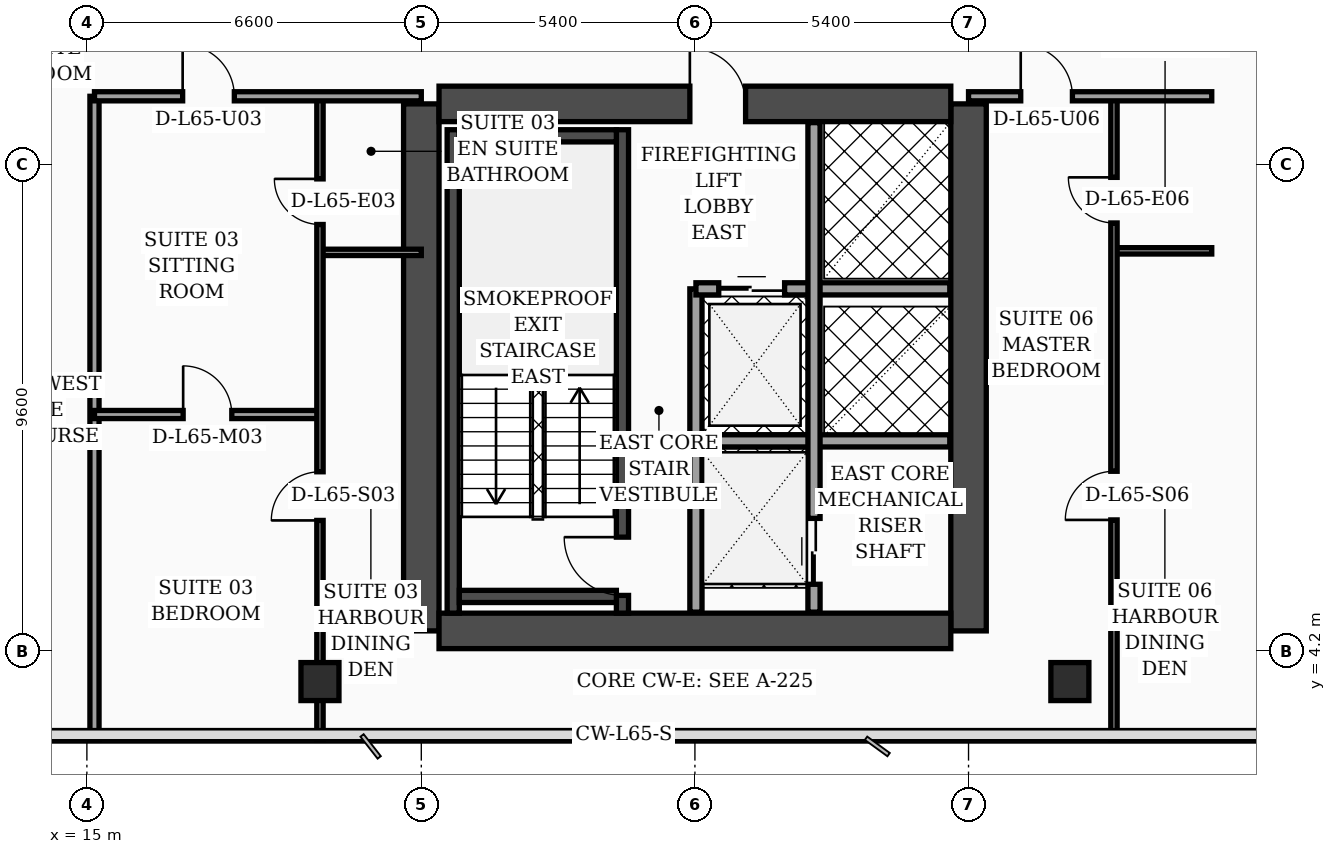
"""IFC4 building model, lengths in metres.
Left out: names, types, materials, properties, quantities, classifications, styles, units other than length and angle.
Written with IfcOpenShell. Run it as: python <this file> out.ifc"""

import sys

from ifc_helpers import new_model, si_unit, direction, frame, frame_2d, origin, origin_2d, place, context, subcontext, project, spatial, rectangle, hollow_rectangle, extrude, element, fill, save


model = new_model("IFC4")
c1 = context("Model", 3, precision=1e-05, world=origin(), true_north=direction((0.0, 1.0)))
c2 = subcontext(c1, "Body", "Model", "MODEL_VIEW")
j1 = project(units=[si_unit("LENGTHUNIT", "METRE"), si_unit("PLANEANGLEUNIT", "RADIAN")], contexts=[c1])
p1 = place(None, origin())
s1 = spatial("IfcSite", under=j1, at=p1, CompositionType="ELEMENT")
p2 = place(p1, origin())
s2 = spatial("IfcBuilding", under=s1, at=p2, CompositionType="ELEMENT")
p3 = place(p2, frame((0.0, 0.0, 263.5)))
s3 = spatial("IfcBuildingStorey", under=s2, at=p3, CompositionType="ELEMENT", Elevation=263.5)
for number, where, z_axis, x_axis in (
    (1, (21.6, 4.6, 0.0), (0.0, 0.0, 1.0), (0.0, 1.0, 0.0)),
    (2, (32.4, 4.6, 0.0), (0.0, 0.0, 1.0), (0.0, 1.0, 0.0)),
):
    element("IfcWall", number, at=place(p3, frame(where, z_axis=z_axis, x_axis=x_axis)), inside=s3, PredefinedType="SHEAR", context=c2, shape_type="SweptSolid", body=[
        extrude(rectangle(XDim=10.4, YDim=0.7, at=frame_2d((5.2, 0.0))), origin(), (0.0, 0.0, 1.0), 3.56),
    ])
p4 = place(p3, frame((21.95, 15.0, 0.0), z_axis=(0.0, 0.0, 1.0), x_axis=(1.0, 0.0, 0.0)))
e3 = element("IfcWall", 3, at=p4, inside=s3, PredefinedType="SHEAR", context=c2, shape_type="SweptSolid", body=[
    extrude(rectangle(XDim=10.1, YDim=0.7, at=frame_2d((5.05, 0.0))), origin(), (0.0, 0.0, 1.0), 3.56),
])
p5 = place(p4, frame((4.95, 0.0, 0.0)))
e4 = element("IfcOpeningElement", 4, at=p5, cuts=e3, PredefinedType="OPENING", context=c2, shape_type="SweptSolid", body=[
    extrude(rectangle(XDim=1.1, YDim=2.2, at=frame_2d((0.55, 1.1))), frame((0.0, 0.36, 0.0), z_axis=(0.0, -1.0, 0.0), x_axis=(1.0, 0.0, 0.0)), (0.0, 0.0, 1.0), 0.72),
])
p6 = place(p3, frame((21.95, 4.6, 0.0), z_axis=(0.0, 0.0, 1.0), x_axis=(1.0, 0.0, 0.0)))
e5 = element("IfcWall", 5, at=p6, inside=s3, PredefinedType="SHEAR", context=c2, shape_type="SweptSolid", body=[
    extrude(rectangle(XDim=10.1, YDim=0.7, at=frame_2d((5.05, 0.0))), origin(), (0.0, 0.0, 1.0), 3.56),
])
p7 = place(p3, frame((22.23, 4.95, 0.0), z_axis=(0.0, 0.0, 1.0), x_axis=(0.0, 1.0, 0.0)))
e6 = element("IfcWall", 6, at=p7, inside=s3, PredefinedType="SOLIDWALL", context=c2, shape_type="SweptSolid", body=[
    extrude(rectangle(XDim=9.54, YDim=0.24, at=frame_2d((4.77, 0.0))), origin(), (0.0, 0.0, 1.0), 3.56),
])
p8 = place(p3, frame((25.57, 4.95, 0.0), z_axis=(0.0, 0.0, 1.0), x_axis=(0.0, 1.0, 0.0)))
e7 = element("IfcWall", 7, at=p8, inside=s3, PredefinedType="SOLIDWALL", context=c2, shape_type="SweptSolid", body=[
    extrude(rectangle(XDim=9.54, YDim=0.24, at=frame_2d((4.77, 0.0))), origin(), (0.0, 0.0, 1.0), 3.56),
])
p9 = place(p8, frame((0.35, 0.0, 0.0)))
e8 = element("IfcOpeningElement", 8, at=p9, cuts=e7, PredefinedType="OPENING", context=c2, shape_type="SweptSolid", body=[
    extrude(rectangle(XDim=1.15, YDim=2.2, at=frame_2d((0.575, 1.1))), frame((0.0, 0.13, 0.0), z_axis=(0.0, -1.0, 0.0), x_axis=(1.0, 0.0, 0.0)), (0.0, 0.0, 1.0), 0.26),
])
for number, where, z_axis, x_axis in (
    (9, (22.35, 5.28, 0.0), (0.0, 0.0, 1.0), (1.0, 0.0, 0.0)),
    (10, (22.35, 14.37, 0.0), (0.0, 0.0, 1.0), (1.0, 0.0, 0.0)),
):
    element("IfcWall", number, at=place(p3, frame(where, z_axis=z_axis, x_axis=x_axis)), inside=s3, PredefinedType="SOLIDWALL", context=c2, shape_type="SweptSolid", body=[
        extrude(rectangle(XDim=3.1, YDim=0.24, at=frame_2d((1.55, 0.0))), origin(), (0.0, 0.0, 1.0), 3.56),
    ])
for number, where, z_axis, x_axis in (
    (11, (19.6, 3.6, 0.0), (0.0, 0.0, 1.0), (1.0, 0.0, 0.0)),
    (12, (34.4, 3.6, 0.0), (0.0, 0.0, 1.0), (1.0, 0.0, 0.0)),
):
    element("IfcColumn", number, at=place(p3, frame(where, z_axis=z_axis, x_axis=x_axis)), inside=s3, PredefinedType="COLUMN", context=c2, shape_type="SweptSolid", body=[
        extrude(hollow_rectangle(XDim=0.75, YDim=0.75, WallThickness=0.032, at=origin_2d()), origin(), (0.0, 0.0, 1.0), 3.56),
    ])
p10 = place(p3, frame((43.83, 5.505, 0.0), z_axis=(0.0, 0.0, 1.0), x_axis=(-0.300509063924, 0.953778958931, 0.0)))
e13 = element("IfcWall", 13, at=p10, inside=s3, PredefinedType="SOLIDWALL", context=c2, shape_type="SweptSolid", body=[
    extrude(rectangle(XDim=30.814, YDim=0.32, at=frame_2d((15.407, 0.0))), origin(), (0.0, 0.0, 1.0), 3.56),
])
p11 = place(p10, frame((8.9, 0.0, 0.0)))
e14 = element("IfcOpeningElement", 14, at=p11, cuts=e13, PredefinedType="OPENING", context=c2, shape_type="SweptSolid", body=[
    extrude(rectangle(XDim=1.4, YDim=2.25, at=frame_2d((0.7, 1.125))), frame((0.0, 0.17, 0.0), z_axis=(0.0, -1.0, 0.0), x_axis=(1.0, 0.0, 0.0)), (0.0, 0.0, 1.0), 0.34),
])
p12 = place(p10, frame((4.437, 0.0, 0.7)))
e15 = element("IfcOpeningElement", 15, at=p12, cuts=e13, PredefinedType="OPENING", context=c2, shape_type="SweptSolid", body=[
    extrude(rectangle(XDim=1.6, YDim=1.65, at=frame_2d((0.8, 0.825))), frame((0.0, 0.17, 0.0), z_axis=(0.0, -1.0, 0.0), x_axis=(1.0, 0.0, 0.0)), (0.0, 0.0, 1.0), 0.34),
])
p13 = place(p10, frame((18.696, 0.0, 0.7)))
e16 = element("IfcOpeningElement", 16, at=p13, cuts=e13, PredefinedType="OPENING", context=c2, shape_type="SweptSolid", body=[
    extrude(rectangle(XDim=1.6, YDim=1.65, at=frame_2d((0.8, 0.825))), frame((0.0, 0.17, 0.0), z_axis=(0.0, -1.0, 0.0), x_axis=(1.0, 0.0, 0.0)), (0.0, 0.0, 1.0), 0.34),
])
p14 = place(p10, frame((1.6, 0.0, 0.75)))
e17 = element("IfcOpeningElement", 17, at=p14, cuts=e13, PredefinedType="OPENING", context=c2, shape_type="SweptSolid", body=[
    extrude(rectangle(XDim=1.5, YDim=1.6, at=frame_2d((0.75, 0.8))), frame((0.0, 0.17, 0.0), z_axis=(0.0, -1.0, 0.0), x_axis=(1.0, 0.0, 0.0)), (0.0, 0.0, 1.0), 0.34),
])
p15 = place(p10, frame((6.75, 0.0, 0.75)))
e18 = element("IfcOpeningElement", 18, at=p15, cuts=e13, PredefinedType="OPENING", context=c2, shape_type="SweptSolid", body=[
    extrude(rectangle(XDim=1.5, YDim=1.6, at=frame_2d((0.75, 0.8))), frame((0.0, 0.17, 0.0), z_axis=(0.0, -1.0, 0.0), x_axis=(1.0, 0.0, 0.0)), (0.0, 0.0, 1.0), 0.34),
])
p16 = place(p10, frame((10.9, 0.0, 0.75)))
e19 = element("IfcOpeningElement", 19, at=p16, cuts=e13, PredefinedType="OPENING", context=c2, shape_type="SweptSolid", body=[
    extrude(rectangle(XDim=1.5, YDim=1.6, at=frame_2d((0.75, 0.8))), frame((0.0, 0.17, 0.0), z_axis=(0.0, -1.0, 0.0), x_axis=(1.0, 0.0, 0.0)), (0.0, 0.0, 1.0), 0.34),
])
p17 = place(p10, frame((14.0, 0.0, 0.75)))
e20 = element("IfcOpeningElement", 20, at=p17, cuts=e13, PredefinedType="OPENING", context=c2, shape_type="SweptSolid", body=[
    extrude(rectangle(XDim=1.5, YDim=1.6, at=frame_2d((0.75, 0.8))), frame((0.0, 0.17, 0.0), z_axis=(0.0, -1.0, 0.0), x_axis=(1.0, 0.0, 0.0)), (0.0, 0.0, 1.0), 0.34),
])
p18 = place(p10, frame((16.55, 0.0, 0.75)))
e21 = element("IfcOpeningElement", 21, at=p18, cuts=e13, PredefinedType="OPENING", context=c2, shape_type="SweptSolid", body=[
    extrude(rectangle(XDim=1.5, YDim=1.6, at=frame_2d((0.75, 0.8))), frame((0.0, 0.17, 0.0), z_axis=(0.0, -1.0, 0.0), x_axis=(1.0, 0.0, 0.0)), (0.0, 0.0, 1.0), 0.34),
])
p19 = place(p10, frame((20.75, 0.0, 0.75)))
e22 = element("IfcOpeningElement", 22, at=p19, cuts=e13, PredefinedType="OPENING", context=c2, shape_type="SweptSolid", body=[
    extrude(rectangle(XDim=1.5, YDim=1.6, at=frame_2d((0.75, 0.8))), frame((0.0, 0.17, 0.0), z_axis=(0.0, -1.0, 0.0), x_axis=(1.0, 0.0, 0.0)), (0.0, 0.0, 1.0), 0.34),
])
p20 = place(p10, frame((23.3, 0.0, 0.75)))
e23 = element("IfcOpeningElement", 23, at=p20, cuts=e13, PredefinedType="OPENING", context=c2, shape_type="SweptSolid", body=[
    extrude(rectangle(XDim=1.5, YDim=1.6, at=frame_2d((0.75, 0.8))), frame((0.0, 0.17, 0.0), z_axis=(0.0, -1.0, 0.0), x_axis=(1.0, 0.0, 0.0)), (0.0, 0.0, 1.0), 0.34),
])
p21 = place(p10, frame((26.4, 0.0, 0.75)))
e24 = element("IfcOpeningElement", 24, at=p21, cuts=e13, PredefinedType="OPENING", context=c2, shape_type="SweptSolid", body=[
    extrude(rectangle(XDim=1.5, YDim=1.6, at=frame_2d((0.75, 0.8))), frame((0.0, 0.17, 0.0), z_axis=(0.0, -1.0, 0.0), x_axis=(1.0, 0.0, 0.0)), (0.0, 0.0, 1.0), 0.34),
])
p22 = place(p3, frame((27.02, 4.97, 0.0), z_axis=(0.0, 0.0, 1.0), x_axis=(0.0, 1.0, 0.0)))
e25 = element("IfcWall", 25, at=p22, inside=s3, PredefinedType="SOLIDWALL", context=c2, shape_type="SweptSolid", body=[
    extrude(rectangle(XDim=6.38, YDim=0.24, at=frame_2d((3.19, 0.0))), origin(), (0.0, 0.0, 1.0), 3.56),
])
p23 = place(p3, frame((27.02, 11.35, 0.0), z_axis=(0.0, 0.0, 1.0), x_axis=(1.0, 0.0, 0.0)))
e26 = element("IfcWall", 26, at=p23, inside=s3, PredefinedType="SOLIDWALL", context=c2, shape_type="SweptSolid", body=[
    extrude(rectangle(XDim=5.01, YDim=0.24, at=frame_2d((2.505, 0.0))), origin(), (0.0, 0.0, 1.0), 3.56),
])
p24 = place(p23, frame((0.45, 0.0, 0.0)))
e27 = element("IfcOpeningElement", 27, at=p24, cuts=e26, PredefinedType="OPENING", context=c2, shape_type="SweptSolid", body=[
    extrude(rectangle(XDim=1.3, YDim=2.35, at=frame_2d((0.65, 1.175))), frame((0.0, 0.13, 0.0), z_axis=(0.0, -1.0, 0.0), x_axis=(1.0, 0.0, 0.0)), (0.0, 0.0, 1.0), 0.26),
])
p25 = place(p3, frame((27.02, 8.35, 0.0), z_axis=(0.0, 0.0, 1.0), x_axis=(1.0, 0.0, 0.0)))
e28 = element("IfcWall", 28, at=p25, inside=s3, PredefinedType="SOLIDWALL", context=c2, shape_type="SweptSolid", body=[
    extrude(rectangle(XDim=5.01, YDim=0.24, at=frame_2d((2.505, 0.0))), origin(), (0.0, 0.0, 1.0), 3.09),
])
p26 = place(p3, frame((29.35, 4.97, 0.0), z_axis=(0.0, 0.0, 1.0), x_axis=(0.0, 1.0, 0.0)))
e29 = element("IfcWall", 29, at=p26, inside=s3, PredefinedType="SOLIDWALL", context=c2, shape_type="SweptSolid", body=[
    extrude(rectangle(XDim=9.66, YDim=0.24, at=frame_2d((4.83, 0.0))), origin(), (0.0, 0.0, 1.0), 3.56),
])
p27 = place(p26, frame((0.55, 0.0, 0.0)))
e30 = element("IfcOpeningElement", 30, at=p27, cuts=e29, PredefinedType="OPENING", context=c2, shape_type="SweptSolid", body=[
    extrude(rectangle(XDim=1.3, YDim=2.35, at=frame_2d((0.65, 1.175))), frame((0.0, 0.13, 0.0), z_axis=(0.0, -1.0, 0.0), x_axis=(1.0, 0.0, 0.0)), (0.0, 0.0, 1.0), 0.26),
])
p28 = place(p3, frame((15.15, 2.44, 0.0), z_axis=(0.0, 0.0, 1.0), x_axis=(0.0, 1.0, 0.0)))
e31 = element("IfcWall", 31, at=p28, inside=s3, PredefinedType="PARTITIONING", context=c2, shape_type="SweptSolid", body=[
    extrude(rectangle(XDim=12.71, YDim=0.18, at=frame_2d((6.355, 0.0))), origin(), (0.0, 0.0, 1.0), 3.09),
])
p29 = place(p3, frame((19.6, 12.07, 0.0), z_axis=(0.0, 0.0, 1.0), x_axis=(1.0, 0.0, 0.0)))
e32 = element("IfcWall", 32, at=p29, inside=s3, PredefinedType="PARTITIONING", context=c2, shape_type="SweptSolid", body=[
    extrude(rectangle(XDim=2.0, YDim=0.125, at=frame_2d((1.0, 0.0))), origin(), (0.0, 0.0, 1.0), 3.56),
])
p30 = place(p3, frame((15.15, 8.87, 0.0), z_axis=(0.0, 0.0, 1.0), x_axis=(1.0, 0.0, 0.0)))
e33 = element("IfcWall", 33, at=p30, inside=s3, PredefinedType="PARTITIONING", context=c2, shape_type="SweptSolid", body=[
    extrude(rectangle(XDim=4.45, YDim=0.16, at=frame_2d((2.225, 0.0))), origin(), (0.0, 0.0, 1.0), 3.56),
])
p31 = place(p30, frame((1.75, 0.0, 0.0)))
e34 = element("IfcOpeningElement", 34, at=p31, cuts=e33, PredefinedType="OPENING", context=c2, shape_type="SweptSolid", body=[
    extrude(rectangle(XDim=0.96, YDim=2.2, at=frame_2d((0.48, 1.1))), frame((0.0, 0.09, 0.0), z_axis=(0.0, -1.0, 0.0), x_axis=(1.0, 0.0, 0.0)), (0.0, 0.0, 1.0), 0.18),
])
p32 = place(p3, frame((19.6, 2.44, 0.0), z_axis=(0.0, 0.0, 1.0), x_axis=(0.0, 1.0, 0.0)))
e35 = element("IfcWall", 35, at=p32, inside=s3, PredefinedType="PARTITIONING", context=c2, shape_type="SweptSolid", body=[
    extrude(rectangle(XDim=12.71, YDim=0.125, at=frame_2d((6.355, 0.0))), origin(), (0.0, 0.0, 1.0), 2.59),
])
p33 = place(p32, frame((4.34, 0.0, 0.0)))
e36 = element("IfcOpeningElement", 36, at=p33, cuts=e35, PredefinedType="OPENING", context=c2, shape_type="SweptSolid", body=[
    extrude(rectangle(XDim=0.96, YDim=2.2, at=frame_2d((0.48, 1.1))), frame((0.0, 0.073, 0.0), z_axis=(0.0, -1.0, 0.0), x_axis=(1.0, 0.0, 0.0)), (0.0, 0.0, 1.0), 0.145),
])
p34 = place(p32, frame((10.18, 0.0, 0.0)))
e37 = element("IfcOpeningElement", 37, at=p34, cuts=e35, PredefinedType="OPENING", context=c2, shape_type="SweptSolid", body=[
    extrude(rectangle(XDim=0.9, YDim=2.15, at=frame_2d((0.45, 1.075))), frame((0.0, 0.073, 0.0), z_axis=(0.0, -1.0, 0.0), x_axis=(1.0, 0.0, 0.0)), (0.0, 0.0, 1.0), 0.145),
])
p35 = place(p3, frame((15.15, 15.15, 0.0), z_axis=(0.0, 0.0, 1.0), x_axis=(1.0, 0.0, 0.0)))
e38 = element("IfcWall", 38, at=p35, inside=s3, PredefinedType="PARTITIONING", context=c2, shape_type="SweptSolid", body=[
    extrude(rectangle(XDim=6.45, YDim=0.18, at=frame_2d((3.225, 0.0))), origin(), (0.0, 0.0, 1.0), 2.59),
])
p36 = place(p35, frame((1.74, 0.0, 0.0)))
e39 = element("IfcOpeningElement", 39, at=p36, cuts=e38, PredefinedType="OPENING", context=c2, shape_type="SweptSolid", body=[
    extrude(rectangle(XDim=1.02, YDim=2.2, at=frame_2d((0.51, 1.1))), frame((0.0, 0.1, 0.0), z_axis=(0.0, -1.0, 0.0), x_axis=(1.0, 0.0, 0.0)), (0.0, 0.0, 1.0), 0.2),
])
p37 = place(p3, frame((35.27, 12.1, 0.0), z_axis=(0.0, 0.0, 1.0), x_axis=(1.0, 0.0, 0.0)))
e40 = element("IfcWall", 40, at=p37, inside=s3, PredefinedType="PARTITIONING", context=c2, shape_type="SweptSolid", body=[
    extrude(rectangle(XDim=1.93, YDim=0.125, at=frame_2d((0.965, 0.0))), origin(), (0.0, 0.0, 1.0), 3.56),
])
p38 = place(p3, frame((35.27, 2.44, 0.0), z_axis=(0.0, 0.0, 1.0), x_axis=(0.0, 1.0, 0.0)))
e41 = element("IfcWall", 41, at=p38, inside=s3, PredefinedType="PARTITIONING", context=c2, shape_type="SweptSolid", body=[
    extrude(rectangle(XDim=12.71, YDim=0.125, at=frame_2d((6.355, 0.0))), origin(), (0.0, 0.0, 1.0), 2.99),
])
p39 = place(p38, frame((4.35, 0.0, 0.0)))
e42 = element("IfcOpeningElement", 42, at=p39, cuts=e41, PredefinedType="OPENING", context=c2, shape_type="SweptSolid", body=[
    extrude(rectangle(XDim=0.96, YDim=2.2, at=frame_2d((0.48, 1.1))), frame((0.0, 0.073, 0.0), z_axis=(0.0, -1.0, 0.0), x_axis=(1.0, 0.0, 0.0)), (0.0, 0.0, 1.0), 0.145),
])
p40 = place(p38, frame((10.21, 0.0, 0.0)))
e43 = element("IfcOpeningElement", 43, at=p40, cuts=e41, PredefinedType="OPENING", context=c2, shape_type="SweptSolid", body=[
    extrude(rectangle(XDim=0.9, YDim=2.15, at=frame_2d((0.45, 1.075))), frame((0.0, 0.073, 0.0), z_axis=(0.0, -1.0, 0.0), x_axis=(1.0, 0.0, 0.0)), (0.0, 0.0, 1.0), 0.145),
])
p41 = place(p3, frame((32.4, 15.15, 0.0), z_axis=(0.0, 0.0, 1.0), x_axis=(1.0, 0.0, 0.0)))
e44 = element("IfcWall", 44, at=p41, inside=s3, PredefinedType="PARTITIONING", context=c2, shape_type="SweptSolid", body=[
    extrude(rectangle(XDim=4.8, YDim=0.18, at=frame_2d((2.4, 0.0))), origin(), (0.0, 0.0, 1.0), 2.99),
])
p42 = place(p41, frame((1.03, 0.0, 0.0)))
e45 = element("IfcOpeningElement", 45, at=p42, cuts=e44, PredefinedType="OPENING", context=c2, shape_type="SweptSolid", body=[
    extrude(rectangle(XDim=1.02, YDim=2.2, at=frame_2d((0.51, 1.1))), frame((0.0, 0.1, 0.0), z_axis=(0.0, -1.0, 0.0), x_axis=(1.0, 0.0, 0.0)), (0.0, 0.0, 1.0), 0.2),
])
p43 = place(p24, origin())
e46 = element("IfcDoor", 46, at=p43, inside=s3, OperationType="DOUBLE_DOOR_SLIDING", PredefinedType="DOOR", context=c2, shape_type="SweptSolid", body=[
    extrude(rectangle(XDim=1.3, YDim=2.35, at=frame_2d((0.65, 1.175))), frame((0.0, 0.025, 0.0), z_axis=(0.0, -1.0, 0.0), x_axis=(1.0, 0.0, 0.0)), (0.0, 0.0, 1.0), 0.05),
])
fill(e27, e46)
p44 = place(p27, origin())
e47 = element("IfcDoor", 47, at=p44, inside=s3, OperationType="DOUBLE_DOOR_SLIDING", PredefinedType="DOOR", context=c2, shape_type="SweptSolid", body=[
    extrude(rectangle(XDim=1.3, YDim=2.35, at=frame_2d((0.65, 1.175))), frame((0.0, 0.025, 0.0), z_axis=(0.0, -1.0, 0.0), x_axis=(1.0, 0.0, 0.0)), (0.0, 0.0, 1.0), 0.05),
])
fill(e30, e47)
p45 = place(p31, origin())
e48 = element("IfcDoor", 48, at=p45, inside=s3, OperationType="SINGLE_SWING_LEFT", PredefinedType="DOOR", context=c2, shape_type="SweptSolid", body=[
    extrude(rectangle(XDim=0.96, YDim=2.2, at=frame_2d((0.48, 1.1))), frame((0.0, 0.025, 0.0), z_axis=(0.0, -1.0, 0.0), x_axis=(1.0, 0.0, 0.0)), (0.0, 0.0, 1.0), 0.05),
])
fill(e34, e48)
p46 = place(p33, origin())
e49 = element("IfcDoor", 49, at=p46, inside=s3, OperationType="SINGLE_SWING_LEFT", PredefinedType="DOOR", context=c2, shape_type="SweptSolid", body=[
    extrude(rectangle(XDim=0.96, YDim=2.2, at=frame_2d((0.48, 1.1))), frame((0.0, 0.025, 0.0), z_axis=(0.0, -1.0, 0.0), x_axis=(1.0, 0.0, 0.0)), (0.0, 0.0, 1.0), 0.05),
])
fill(e36, e49)
p47 = place(p34, origin())
e50 = element("IfcDoor", 50, at=p47, inside=s3, OperationType="SINGLE_SWING_RIGHT", PredefinedType="DOOR", context=c2, shape_type="SweptSolid", body=[
    extrude(rectangle(XDim=0.9, YDim=2.15, at=frame_2d((0.45, 1.075))), frame((0.0, 0.025, 0.0), z_axis=(0.0, -1.0, 0.0), x_axis=(1.0, 0.0, 0.0)), (0.0, 0.0, 1.0), 0.05),
])
fill(e37, e50)
p48 = place(p36, origin())
e51 = element("IfcDoor", 51, at=p48, inside=s3, OperationType="SINGLE_SWING_LEFT", PredefinedType="DOOR", context=c2, shape_type="SweptSolid", body=[
    extrude(rectangle(XDim=1.02, YDim=2.2, at=frame_2d((0.51, 1.1))), frame((0.0, 0.025, 0.0), z_axis=(0.0, -1.0, 0.0), x_axis=(1.0, 0.0, 0.0)), (0.0, 0.0, 1.0), 0.05),
])
fill(e39, e51)
p49 = place(p39, origin())
e52 = element("IfcDoor", 52, at=p49, inside=s3, OperationType="SINGLE_SWING_LEFT", PredefinedType="DOOR", context=c2, shape_type="SweptSolid", body=[
    extrude(rectangle(XDim=0.96, YDim=2.2, at=frame_2d((0.48, 1.1))), frame((0.0, 0.025, 0.0), z_axis=(0.0, -1.0, 0.0), x_axis=(1.0, 0.0, 0.0)), (0.0, 0.0, 1.0), 0.05),
])
fill(e42, e52)
p50 = place(p40, origin())
e53 = element("IfcDoor", 53, at=p50, inside=s3, OperationType="SINGLE_SWING_RIGHT", PredefinedType="DOOR", context=c2, shape_type="SweptSolid", body=[
    extrude(rectangle(XDim=0.9, YDim=2.15, at=frame_2d((0.45, 1.075))), frame((0.0, 0.025, 0.0), z_axis=(0.0, -1.0, 0.0), x_axis=(1.0, 0.0, 0.0)), (0.0, 0.0, 1.0), 0.05),
])
fill(e43, e53)
p51 = place(p42, origin())
e54 = element("IfcDoor", 54, at=p51, inside=s3, OperationType="SINGLE_SWING_LEFT", PredefinedType="DOOR", context=c2, shape_type="SweptSolid", body=[
    extrude(rectangle(XDim=1.02, YDim=2.2, at=frame_2d((0.51, 1.1))), frame((0.0, 0.025, 0.0), z_axis=(0.0, -1.0, 0.0), x_axis=(1.0, 0.0, 0.0)), (0.0, 0.0, 1.0), 0.05),
])
fill(e45, e54)
p52 = place(p9, origin())
e55 = element("IfcDoor", 55, at=p52, inside=s3, OperationType="SINGLE_SWING_RIGHT", PredefinedType="DOOR", context=c2, shape_type="SweptSolid", body=[
    extrude(rectangle(XDim=1.15, YDim=2.2, at=frame_2d((0.575, 1.1))), frame((0.0, 0.025, 0.0), z_axis=(0.0, -1.0, 0.0), x_axis=(1.0, 0.0, 0.0)), (0.0, 0.0, 1.0), 0.05),
])
fill(e8, e55)
p53 = place(p5, origin())
e56 = element("IfcDoor", 56, at=p53, inside=s3, OperationType="SINGLE_SWING_LEFT", PredefinedType="DOOR", context=c2, shape_type="SweptSolid", body=[
    extrude(rectangle(XDim=1.1, YDim=2.2, at=frame_2d((0.55, 1.1))), frame((0.0, 0.025, 0.0), z_axis=(0.0, -1.0, 0.0), x_axis=(1.0, 0.0, 0.0)), (0.0, 0.0, 1.0), 0.05),
])
fill(e4, e56)
save(model, sys.argv[1])
